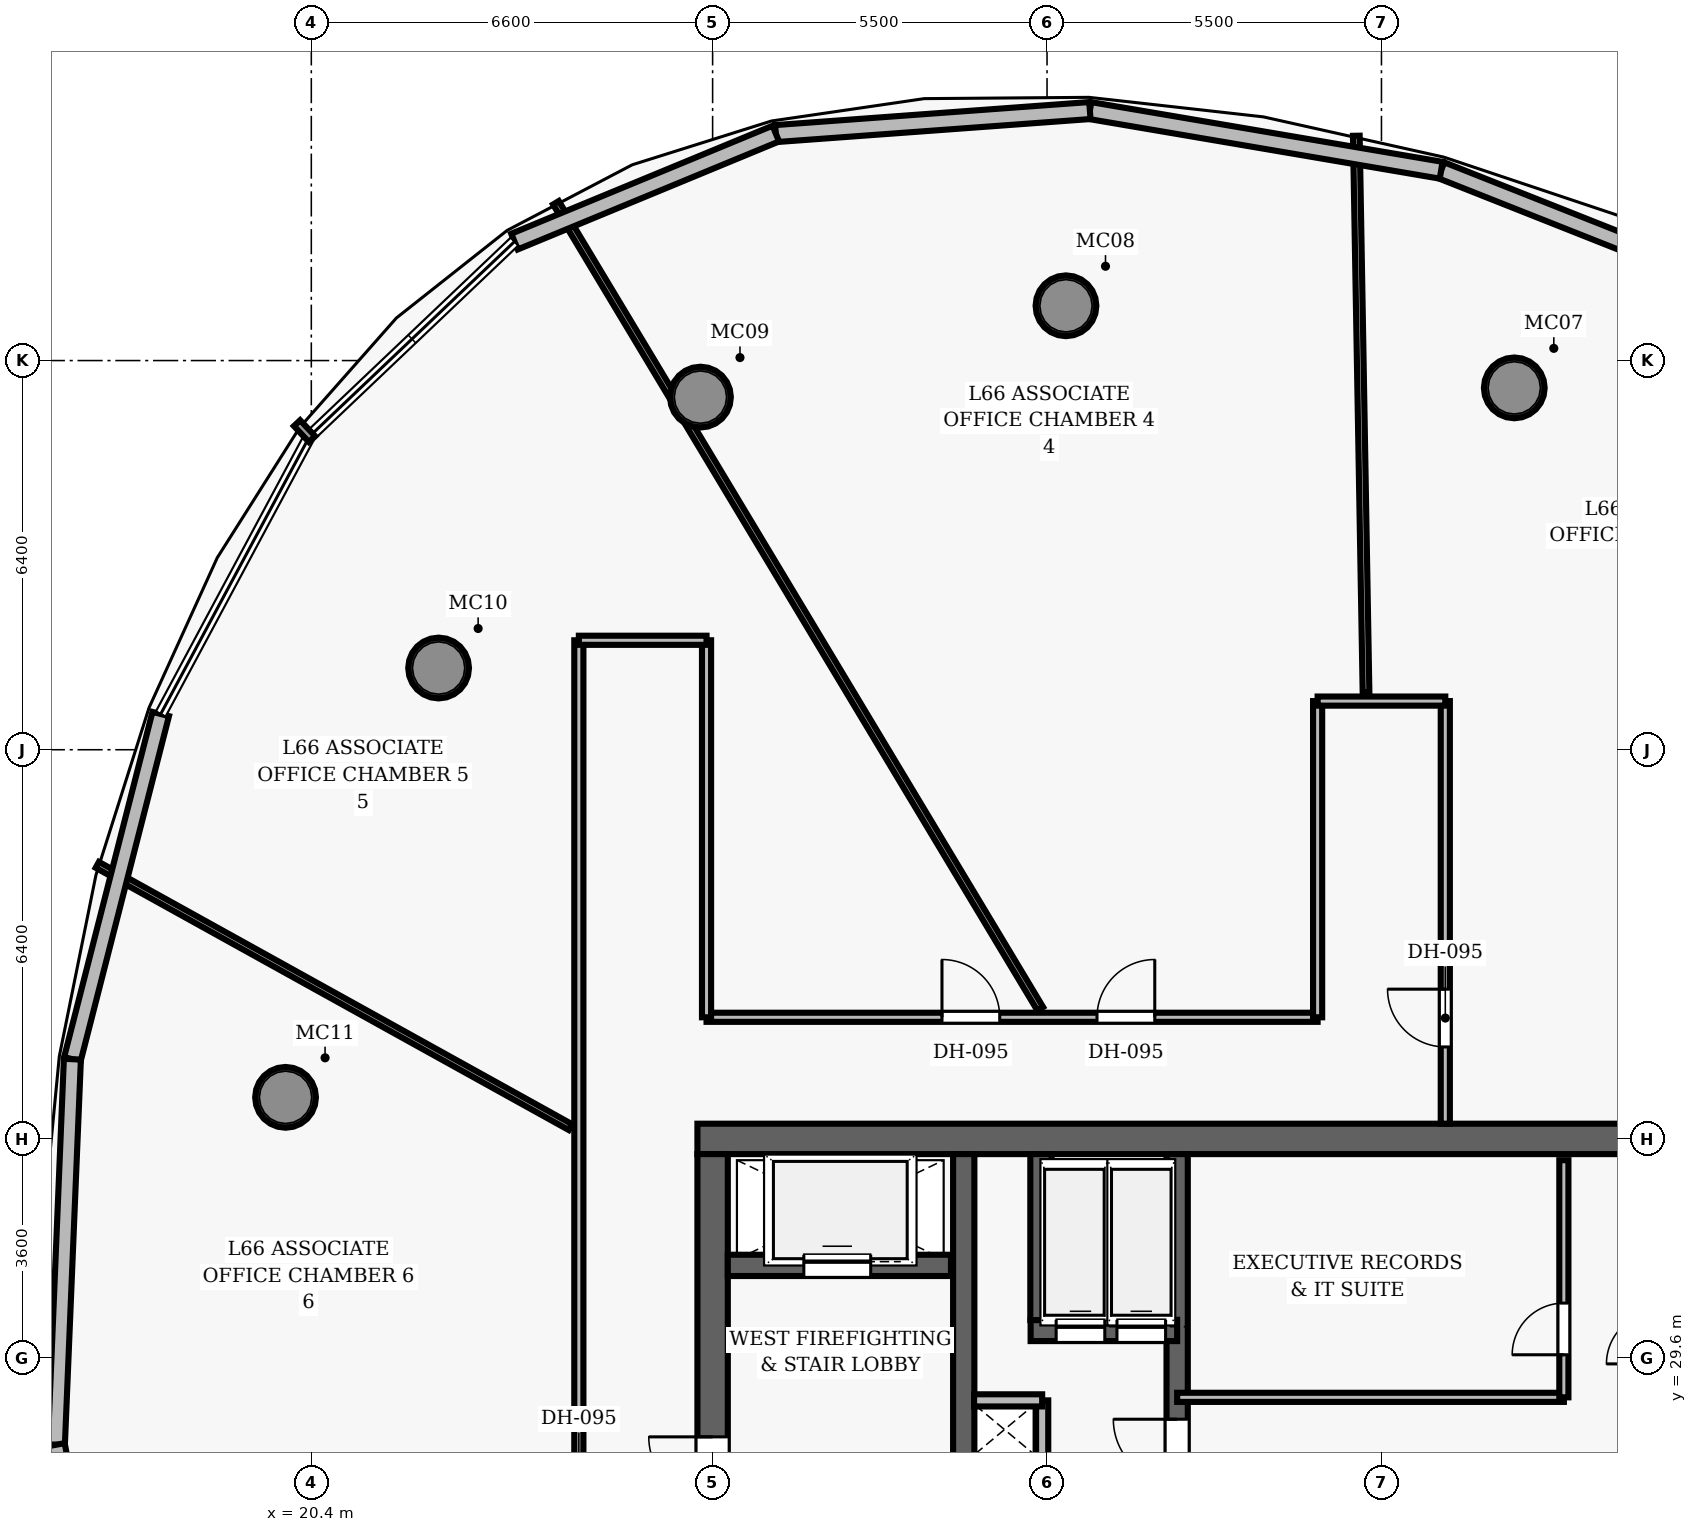
"""IFC4 building model, lengths in metres.
Left out: names, types, materials, properties, quantities, classifications, styles, units other than length and angle.
Written with IfcOpenShell. Run it as: python <this file> out.ifc"""

import sys

from ifc_helpers import new_model, si_unit, direction, frame, frame_2d, origin, origin_2d, place, context, subcontext, project, spatial, rectangle, hollow_circle, extrude, element, fill, save


model = new_model("IFC4")
c1 = context("Model", 3, precision=1e-05, world=origin(), true_north=direction((0.0, 1.0)))
c2 = subcontext(c1, "Body", "Model", "MODEL_VIEW")
j1 = project(units=[si_unit("LENGTHUNIT", "METRE"), si_unit("PLANEANGLEUNIT", "RADIAN")], contexts=[c1])
p1 = place(None, origin())
s1 = spatial("IfcSite", under=j1, at=p1, CompositionType="ELEMENT")
p2 = place(p1, origin())
s2 = spatial("IfcBuilding", under=s1, at=p2, CompositionType="ELEMENT")
p3 = place(p2, frame((0.0, 0.0, 261.3)))
s3 = spatial("IfcBuildingStorey", under=s2, at=p3, CompositionType="ELEMENT", Elevation=261.3)
p4 = place(p3, frame((26.75, 33.2, 0.0), z_axis=(0.0, 0.0, 1.0), x_axis=(1.0, 0.0, 0.0)))
e1 = element("IfcWall", 1, at=p4, inside=s3, PredefinedType="SHEAR", context=c2, shape_type="SweptSolid", body=[
    extrude(rectangle(XDim=22.5, YDim=0.5, at=frame_2d((11.25, 0.0))), origin(), (0.0, 0.0, 1.0), 3.85),
])
p5 = place(p3, frame((27.0, 19.05, 0.0), z_axis=(0.0, 0.0, 1.0), x_axis=(0.0, 1.0, 0.0)))
e2 = element("IfcWall", 2, at=p5, inside=s3, PredefinedType="SHEAR", context=c2, shape_type="SweptSolid", body=[
    extrude(rectangle(XDim=13.9, YDim=0.5, at=frame_2d((6.95, 0.0))), origin(), (0.0, 0.0, 1.0), 3.85),
])
p6 = place(p5, frame((8.2, 0.0, 0.0)))
e3 = element("IfcOpeningElement", 3, at=p6, cuts=e2, PredefinedType="OPENING", context=c2, shape_type="SweptSolid", body=[
    extrude(rectangle(XDim=1.05, YDim=2.15, at=frame_2d((0.525, 1.075))), frame((0.0, 0.26, 0.0), z_axis=(0.0, -1.0, 0.0), x_axis=(1.0, 0.0, 0.0)), (0.0, 0.0, 1.0), 0.52),
])
p7 = place(p3, frame((31.13, 19.05, 0.0), z_axis=(0.0, 0.0, 1.0), x_axis=(0.0, 1.0, 0.0)))
e4 = element("IfcWall", 4, at=p7, inside=s3, PredefinedType="SHEAR", context=c2, shape_type="SweptSolid", body=[
    extrude(rectangle(XDim=13.9, YDim=0.35, at=frame_2d((6.95, 0.0))), origin(), (0.0, 0.0, 1.0), 3.85),
])
for number, where, z_axis, x_axis in (
    (5, (40.185, 45.551, 0.0), (0.0, 0.0, 1.0), (1.0, 0.0, 0.0)),
    (6, (32.812, 46.901, 0.0), (0.0, 0.0, 1.0), (1.0, 0.0, 0.0)),
    (7, (26.8, 45.399, 0.0), (0.0, 0.0, 1.0), (1.0, 0.0, 0.0)),
    (8, (22.494, 40.944, 0.0), (0.0, 0.0, 1.0), (1.0, 0.0, 0.0)),
    (9, (19.976, 33.884, 0.0), (0.0, 0.0, 1.0), (1.0, 0.0, 0.0)),
):
    element("IfcColumn", number, at=place(p3, frame(where, z_axis=z_axis, x_axis=x_axis)), inside=s3, PredefinedType="COLUMN", context=c2, shape_type="SweptSolid", body=[
        extrude(hollow_circle(Radius=0.5, WallThickness=0.045, at=origin_2d()), origin(), (0.0, 0.0, 1.0), 3.85),
    ])
p8 = place(p3, frame((27.25, 31.12, 0.0), z_axis=(0.0, 0.0, 1.0), x_axis=(1.0, 0.0, 0.0)))
e10 = element("IfcWall", 10, at=p8, inside=s3, PredefinedType="SHEAR", context=c2, shape_type="SweptSolid", body=[
    extrude(rectangle(XDim=3.67, YDim=0.35, at=frame_2d((1.835, 0.0))), origin(), (0.0, 0.0, 1.0), 3.04),
])
p9 = place(p8, frame((1.25, 0.0, 0.0)))
e11 = element("IfcOpeningElement", 11, at=p9, cuts=e10, PredefinedType="OPENING", context=c2, shape_type="SweptSolid", body=[
    extrude(rectangle(XDim=1.1, YDim=2.15, at=frame_2d((0.55, 1.075))), frame((0.0, 0.185, 0.0), z_axis=(0.0, -1.0, 0.0), x_axis=(1.0, 0.0, 0.0)), (0.0, 0.0, 1.0), 0.37),
])
p10 = place(p3, frame((34.64, 26.69, 0.0), z_axis=(0.0, 0.0, 1.0), x_axis=(0.0, 1.0, 0.0)))
e12 = element("IfcWall", 12, at=p10, inside=s3, PredefinedType="SHEAR", context=c2, shape_type="SweptSolid", body=[
    extrude(rectangle(XDim=6.26, YDim=0.35, at=frame_2d((3.13, 0.0))), origin(), (0.0, 0.0, 1.0), 3.85),
])
p11 = place(p10, frame((0.85, 0.0, 0.0)))
e13 = element("IfcOpeningElement", 13, at=p11, cuts=e12, PredefinedType="OPENING", context=c2, shape_type="SweptSolid", body=[
    extrude(rectangle(XDim=1.05, YDim=2.15, at=frame_2d((0.525, 1.075))), frame((0.0, 0.185, 0.0), z_axis=(0.0, -1.0, 0.0), x_axis=(1.0, 0.0, 0.0)), (0.0, 0.0, 1.0), 0.37),
])
p12 = place(p3, frame((32.23, 30.05, 0.0), z_axis=(0.0, 0.0, 1.0), x_axis=(1.0, 0.0, 0.0)))
e14 = element("IfcWall", 14, at=p12, inside=s3, PredefinedType="SHEAR", context=c2, shape_type="SweptSolid", body=[
    extrude(rectangle(XDim=2.41, YDim=0.35, at=frame_2d((1.205, 0.0))), origin(), (0.0, 0.0, 1.0), 3.04),
])
p13 = place(p12, frame((0.42, 0.0, 0.0)))
e15 = element("IfcOpeningElement", 15, at=p13, cuts=e14, PredefinedType="OPENING", context=c2, shape_type="SweptSolid", body=[
    extrude(rectangle(XDim=0.8, YDim=2.15, at=frame_2d((0.4, 1.075))), frame((0.0, 0.185, 0.0), z_axis=(0.0, -1.0, 0.0), x_axis=(1.0, 0.0, 0.0)), (0.0, 0.0, 1.0), 0.37),
])
p14 = place(p12, frame((1.42, 0.0, 0.0)))
e16 = element("IfcOpeningElement", 16, at=p14, cuts=e14, PredefinedType="OPENING", context=c2, shape_type="SweptSolid", body=[
    extrude(rectangle(XDim=0.8, YDim=2.15, at=frame_2d((0.4, 1.075))), frame((0.0, 0.185, 0.0), z_axis=(0.0, -1.0, 0.0), x_axis=(1.0, 0.0, 0.0)), (0.0, 0.0, 1.0), 0.37),
])
p15 = place(p3, frame((32.4, 30.22, 0.0), z_axis=(0.0, 0.0, 1.0), x_axis=(0.0, 1.0, 0.0)))
e17 = element("IfcWall", 17, at=p15, inside=s3, PredefinedType="SHEAR", context=c2, shape_type="SweptSolid", body=[
    extrude(rectangle(XDim=2.73, YDim=0.35, at=frame_2d((1.365, 0.0))), origin(), (0.0, 0.0, 1.0), 3.04),
])
p16 = place(p3, frame((32.42, 26.86, 0.0), z_axis=(0.0, 0.0, 1.0), x_axis=(0.0, 1.0, 0.0)))
e18 = element("IfcWall", 18, at=p16, inside=s3, PredefinedType="PARTITIONING", context=c2, shape_type="SweptSolid", body=[
    extrude(rectangle(XDim=2.04, YDim=0.2, at=frame_2d((1.02, 0.0))), origin(), (0.0, 0.0, 1.0), 3.04),
])
p17 = place(p16, frame((0.14, 0.0, 0.0)))
e19 = element("IfcOpeningElement", 19, at=p17, cuts=e18, PredefinedType="OPENING", context=c2, shape_type="SweptSolid", body=[
    extrude(rectangle(XDim=0.8, YDim=2.05, at=frame_2d((0.4, 1.025))), frame((0.0, 0.11, 0.0), z_axis=(0.0, -1.0, 0.0), x_axis=(1.0, 0.0, 0.0)), (0.0, 0.0, 1.0), 0.22),
])
p18 = place(p3, frame((31.3, 28.9, 0.0), z_axis=(0.0, 0.0, 1.0), x_axis=(1.0, 0.0, 0.0)))
e20 = element("IfcWall", 20, at=p18, inside=s3, PredefinedType="PARTITIONING", context=c2, shape_type="SweptSolid", body=[
    extrude(rectangle(XDim=1.12, YDim=0.2, at=frame_2d((0.56, 0.0))), origin(), (0.0, 0.0, 1.0), 3.04),
])
p19 = place(p3, frame((34.64, 28.95, 0.0), z_axis=(0.0, 0.0, 1.0), x_axis=(1.0, 0.0, 0.0)))
e21 = element("IfcWall", 21, at=p19, inside=s3, PredefinedType="PARTITIONING", context=c2, shape_type="SweptSolid", body=[
    extrude(rectangle(XDim=6.36, YDim=0.15, at=frame_2d((3.18, 0.0))), origin(), (0.0, 0.0, 1.0), 3.04),
])
p20 = place(p3, frame((41.0, 28.95, 0.0), z_axis=(0.0, 0.0, 1.0), x_axis=(0.0, 1.0, 0.0)))
e22 = element("IfcWall", 22, at=p20, inside=s3, PredefinedType="PARTITIONING", context=c2, shape_type="SweptSolid", body=[
    extrude(rectangle(XDim=3.9, YDim=0.15, at=frame_2d((1.95, 0.0))), origin(), (0.0, 0.0, 1.0), 3.04),
])
p21 = place(p20, frame((0.7, 0.0, 0.0)))
e23 = element("IfcOpeningElement", 23, at=p21, cuts=e22, PredefinedType="OPENING", context=c2, shape_type="SweptSolid", body=[
    extrude(rectangle(XDim=0.85, YDim=2.1, at=frame_2d((0.425, 1.05))), frame((0.0, 0.085, 0.0), z_axis=(0.0, -1.0, 0.0), x_axis=(1.0, 0.0, 0.0)), (0.0, 0.0, 1.0), 0.17),
])
p22 = place(p3, frame((26.9, 35.2, 0.0), z_axis=(0.0, 0.0, 1.0), x_axis=(1.0, 0.0, 0.0)))
e24 = element("IfcWall", 24, at=p22, inside=s3, PredefinedType="PARTITIONING", context=c2, shape_type="SweptSolid", body=[
    extrude(rectangle(XDim=10.05, YDim=0.15, at=frame_2d((5.025, 0.0))), origin(), (0.0, 0.0, 1.0), 3.04),
])
p23 = place(p22, frame((6.422, 0.0, 0.0)))
e25 = element("IfcOpeningElement", 25, at=p23, cuts=e24, PredefinedType="OPENING", context=c2, shape_type="SweptSolid", body=[
    extrude(rectangle(XDim=0.95, YDim=2.15, at=frame_2d((0.475, 1.075))), frame((0.0, 0.085, 0.0), z_axis=(0.0, -1.0, 0.0), x_axis=(1.0, 0.0, 0.0)), (0.0, 0.0, 1.0), 0.17),
])
p24 = place(p22, frame((3.872, 0.0, 0.0)))
e26 = element("IfcOpeningElement", 26, at=p24, cuts=e24, PredefinedType="OPENING", context=c2, shape_type="SweptSolid", body=[
    extrude(rectangle(XDim=0.95, YDim=2.15, at=frame_2d((0.475, 1.075))), frame((0.0, 0.085, 0.0), z_axis=(0.0, -1.0, 0.0), x_axis=(1.0, 0.0, 0.0)), (0.0, 0.0, 1.0), 0.17),
])
p25 = place(p3, frame((24.8, 11.32, 0.0), z_axis=(0.0, 0.0, 1.0), x_axis=(0.0, 1.0, 0.0)))
e27 = element("IfcWall", 27, at=p25, inside=s3, PredefinedType="PARTITIONING", context=c2, shape_type="SweptSolid", body=[
    extrude(rectangle(XDim=30.08, YDim=0.15, at=frame_2d((15.04, 0.0))), origin(), (0.0, 0.0, 1.0), 3.04),
])
p26 = place(p25, frame((15.729, 0.0, 0.0)))
e28 = element("IfcOpeningElement", 28, at=p26, cuts=e27, PredefinedType="OPENING", context=c2, shape_type="SweptSolid", body=[
    extrude(rectangle(XDim=0.95, YDim=2.15, at=frame_2d((0.475, 1.075))), frame((0.0, 0.085, 0.0), z_axis=(0.0, -1.0, 0.0), x_axis=(1.0, 0.0, 0.0)), (0.0, 0.0, 1.0), 0.17),
])
p27 = place(p25, frame((11.34, 0.0, 0.0)))
e29 = element("IfcOpeningElement", 29, at=p27, cuts=e27, PredefinedType="OPENING", context=c2, shape_type="SweptSolid", body=[
    extrude(rectangle(XDim=0.95, YDim=2.15, at=frame_2d((0.475, 1.075))), frame((0.0, 0.085, 0.0), z_axis=(0.0, -1.0, 0.0), x_axis=(1.0, 0.0, 0.0)), (0.0, 0.0, 1.0), 0.17),
])
p28 = place(p3, frame((26.9, 35.2, 0.0), z_axis=(0.0, 0.0, 1.0), x_axis=(0.0, 1.0, 0.0)))
e30 = element("IfcWall", 30, at=p28, inside=s3, PredefinedType="PARTITIONING", context=c2, shape_type="SweptSolid", body=[
    extrude(rectangle(XDim=6.2, YDim=0.15, at=frame_2d((3.1, 0.0))), origin(), (0.0, 0.0, 1.0), 3.04),
])
p29 = place(p3, frame((24.8, 41.4, 0.0), z_axis=(0.0, 0.0, 1.0), x_axis=(1.0, 0.0, 0.0)))
e31 = element("IfcWall", 31, at=p29, inside=s3, PredefinedType="PARTITIONING", context=c2, shape_type="SweptSolid", body=[
    extrude(rectangle(XDim=2.1, YDim=0.15, at=frame_2d((1.05, 0.0))), origin(), (0.0, 0.0, 1.0), 3.04),
])
p30 = place(p3, frame((36.95, 35.2, 0.0), z_axis=(0.0, 0.0, 1.0), x_axis=(0.0, 1.0, 0.0)))
e32 = element("IfcWall", 32, at=p30, inside=s3, PredefinedType="PARTITIONING", context=c2, shape_type="SweptSolid", body=[
    extrude(rectangle(XDim=5.2, YDim=0.15, at=frame_2d((2.6, 0.0))), origin(), (0.0, 0.0, 1.0), 3.04),
])
p31 = place(p3, frame((39.05, 33.45, 0.0), z_axis=(0.0, 0.0, 1.0), x_axis=(0.0, 1.0, 0.0)))
e33 = element("IfcWall", 33, at=p31, inside=s3, PredefinedType="PARTITIONING", context=c2, shape_type="SweptSolid", body=[
    extrude(rectangle(XDim=6.95, YDim=0.15, at=frame_2d((3.475, 0.0))), origin(), (0.0, 0.0, 1.0), 3.04),
])
p32 = place(p31, frame((1.262, 0.0, 0.0)))
e34 = element("IfcOpeningElement", 34, at=p32, cuts=e33, PredefinedType="OPENING", context=c2, shape_type="SweptSolid", body=[
    extrude(rectangle(XDim=0.95, YDim=2.15, at=frame_2d((0.475, 1.075))), frame((0.0, 0.085, 0.0), z_axis=(0.0, -1.0, 0.0), x_axis=(1.0, 0.0, 0.0)), (0.0, 0.0, 1.0), 0.17),
])
p33 = place(p3, frame((36.95, 40.4, 0.0), z_axis=(0.0, 0.0, 1.0), x_axis=(1.0, 0.0, 0.0)))
e35 = element("IfcWall", 35, at=p33, inside=s3, PredefinedType="PARTITIONING", context=c2, shape_type="SweptSolid", body=[
    extrude(rectangle(XDim=2.1, YDim=0.15, at=frame_2d((1.05, 0.0))), origin(), (0.0, 0.0, 1.0), 3.04),
])
p34 = place(p3, frame((37.746, 40.54, 0.0), z_axis=(0.0, 0.0, 1.0), x_axis=(-0.01743409501, 0.999848014616, 0.0)))
e36 = element("IfcWall", 36, at=p34, inside=s3, PredefinedType="PARTITIONING", context=c2, shape_type="SweptSolid", body=[
    extrude(rectangle(XDim=9.158, YDim=0.11, at=frame_2d((4.579, 0.0))), origin(), (0.0, 0.0, 1.0), 3.04),
])
p35 = place(p3, frame((32.388, 35.34, 0.0), z_axis=(0.0, 0.0, 1.0), x_axis=(-0.515043577983, 0.857163994098, 0.0)))
e37 = element("IfcWall", 37, at=p35, inside=s3, PredefinedType="PARTITIONING", context=c2, shape_type="SweptSolid", body=[
    extrude(rectangle(XDim=15.464, YDim=0.11, at=frame_2d((7.732, 0.0))), origin(), (0.0, 0.0, 1.0), 3.04),
])
p36 = place(p3, frame((24.66, 33.395, 0.0), z_axis=(0.0, 0.0, 1.0), x_axis=(-0.874626832341, 0.48479676582, 0.0)))
e38 = element("IfcWall", 38, at=p36, inside=s3, PredefinedType="PARTITIONING", context=c2, shape_type="SweptSolid", body=[
    extrude(rectangle(XDim=8.895, YDim=0.11, at=frame_2d((4.448, 0.0))), origin(), (0.0, 0.0, 1.0), 3.04),
])
p37 = place(p3, frame((38.982, 49.13, 0.0), z_axis=(0.0, 0.0, 1.0), x_axis=(0.929631768462, -0.36848985748, 0.0)))
e39 = element("IfcWall", 39, at=p37, inside=s3, PredefinedType="SOLIDWALL", context=c2, shape_type="SweptSolid", body=[
    extrude(rectangle(XDim=6.345, YDim=0.28, at=frame_2d((3.173, 0.0))), origin(), (0.0, 0.0, 1.0), 3.625),
])
p38 = place(p3, frame((33.205, 50.112, 0.0), z_axis=(0.0, 0.0, 1.0), x_axis=(0.985868784633, -0.167519370479, 0.0)))
e40 = element("IfcWall", 40, at=p38, inside=s3, PredefinedType="SOLIDWALL", context=c2, shape_type="SweptSolid", body=[
    extrude(rectangle(XDim=5.86, YDim=0.28, at=frame_2d((2.93, 0.0))), origin(), (0.0, 0.0, 1.0), 3.625),
])
p39 = place(p3, frame((28.039, 49.733, 0.0), z_axis=(0.0, 0.0, 1.0), x_axis=(0.99732023432, 0.073159758173, 0.0)))
e41 = element("IfcWall", 41, at=p39, inside=s3, PredefinedType="SOLIDWALL", context=c2, shape_type="SweptSolid", body=[
    extrude(rectangle(XDim=5.179, YDim=0.28, at=frame_2d((2.59, 0.0))), origin(), (0.0, 0.0, 1.0), 3.625),
])
p40 = place(p3, frame((23.741, 47.956, 0.0), z_axis=(0.0, 0.0, 1.0), x_axis=(0.924172810094, 0.381974628848, 0.0)))
e42 = element("IfcWall", 42, at=p40, inside=s3, PredefinedType="SOLIDWALL", context=c2, shape_type="SweptSolid", body=[
    extrude(rectangle(XDim=4.65, YDim=0.28, at=frame_2d((2.325, 0.0))), origin(), (0.0, 0.0, 1.0), 3.625),
])
p41 = place(p3, frame((16.47, 34.511, 0.0), z_axis=(0.0, 0.0, 1.0), x_axis=(0.247972381677, 0.968767102004, 0.0)))
e43 = element("IfcWall", 43, at=p41, inside=s3, PredefinedType="SOLIDWALL", context=c2, shape_type="SweptSolid", body=[
    extrude(rectangle(XDim=5.86, YDim=0.28, at=frame_2d((2.93, 0.0))), origin(), (0.0, 0.0, 1.0), 3.625),
])
p42 = place(p3, frame((16.207, 28.171, 0.0), z_axis=(0.0, 0.0, 1.0), x_axis=(0.04151531728, 0.999137867579, 0.0)))
e44 = element("IfcWall", 44, at=p42, inside=s3, PredefinedType="SOLIDWALL", context=c2, shape_type="SweptSolid", body=[
    extrude(rectangle(XDim=6.345, YDim=0.28, at=frame_2d((3.173, 0.0))), origin(), (0.0, 0.0, 1.0), 3.625),
])
p43 = place(p3, frame((17.385, 21.752, 0.0), z_axis=(0.0, 0.0, 1.0), x_axis=(-0.180429210123, 0.983587972748, 0.0)))
e45 = element("IfcWall", 45, at=p43, inside=s3, PredefinedType="SOLIDWALL", context=c2, shape_type="SweptSolid", body=[
    extrude(rectangle(XDim=6.526, YDim=0.28, at=frame_2d((3.263, 0.0))), origin(), (0.0, 0.0, 1.0), 3.625),
])
p44 = place(p6, origin())
e46 = element("IfcDoor", 46, at=p44, inside=s3, OperationType="SINGLE_SWING_RIGHT", PredefinedType="DOOR", context=c2, shape_type="SweptSolid", body=[
    extrude(rectangle(XDim=1.05, YDim=2.15, at=frame_2d((0.525, 1.075))), frame((0.0, 0.025, 0.0), z_axis=(0.0, -1.0, 0.0), x_axis=(1.0, 0.0, 0.0)), (0.0, 0.0, 1.0), 0.05),
])
fill(e3, e46)
p45 = place(p11, origin())
e47 = element("IfcDoor", 47, at=p45, inside=s3, OperationType="SINGLE_SWING_RIGHT", PredefinedType="DOOR", context=c2, shape_type="SweptSolid", body=[
    extrude(rectangle(XDim=1.05, YDim=2.15, at=frame_2d((0.525, 1.075))), frame((0.0, 0.025, 0.0), z_axis=(0.0, -1.0, 0.0), x_axis=(1.0, 0.0, 0.0)), (0.0, 0.0, 1.0), 0.05),
])
fill(e13, e47)
p46 = place(p21, origin())
e48 = element("IfcDoor", 48, at=p46, inside=s3, OperationType="SINGLE_SWING_LEFT", PredefinedType="DOOR", context=c2, shape_type="SweptSolid", body=[
    extrude(rectangle(XDim=0.85, YDim=2.1, at=frame_2d((0.425, 1.05))), frame((0.0, 0.025, 0.0), z_axis=(0.0, -1.0, 0.0), x_axis=(1.0, 0.0, 0.0)), (0.0, 0.0, 1.0), 0.05),
])
fill(e23, e48)
p47 = place(p32, origin())
e49 = element("IfcDoor", 49, at=p47, inside=s3, OperationType="SINGLE_SWING_RIGHT", PredefinedType="DOOR", context=c2, shape_type="SweptSolid", body=[
    extrude(rectangle(XDim=0.95, YDim=2.15, at=frame_2d((0.475, 1.075))), frame((0.0, 0.025, 0.0), z_axis=(0.0, -1.0, 0.0), x_axis=(1.0, 0.0, 0.0)), (0.0, 0.0, 1.0), 0.05),
])
fill(e34, e49)
p48 = place(p23, origin())
e50 = element("IfcDoor", 50, at=p48, inside=s3, OperationType="SINGLE_SWING_RIGHT", PredefinedType="DOOR", context=c2, shape_type="SweptSolid", body=[
    extrude(rectangle(XDim=0.95, YDim=2.15, at=frame_2d((0.475, 1.075))), frame((0.0, 0.025, 0.0), z_axis=(0.0, -1.0, 0.0), x_axis=(1.0, 0.0, 0.0)), (0.0, 0.0, 1.0), 0.05),
])
fill(e25, e50)
p49 = place(p24, origin())
e51 = element("IfcDoor", 51, at=p49, inside=s3, OperationType="SINGLE_SWING_LEFT", PredefinedType="DOOR", context=c2, shape_type="SweptSolid", body=[
    extrude(rectangle(XDim=0.95, YDim=2.15, at=frame_2d((0.475, 1.075))), frame((0.0, 0.025, 0.0), z_axis=(0.0, -1.0, 0.0), x_axis=(1.0, 0.0, 0.0)), (0.0, 0.0, 1.0), 0.05),
])
fill(e26, e51)
p50 = place(p9, origin())
e52 = element("IfcDoor", 52, at=p50, inside=s3, OperationType="SLIDING_TO_LEFT", PredefinedType="DOOR", context=c2, shape_type="SweptSolid", body=[
    extrude(rectangle(XDim=1.1, YDim=2.15, at=frame_2d((0.55, 1.075))), frame((0.0, 0.025, 0.0), z_axis=(0.0, -1.0, 0.0), x_axis=(1.0, 0.0, 0.0)), (0.0, 0.0, 1.0), 0.05),
])
fill(e11, e52)
p51 = place(p13, origin())
e53 = element("IfcDoor", 53, at=p51, inside=s3, OperationType="SLIDING_TO_LEFT", PredefinedType="DOOR", context=c2, shape_type="SweptSolid", body=[
    extrude(rectangle(XDim=0.8, YDim=2.15, at=frame_2d((0.4, 1.075))), frame((0.0, 0.025, 0.0), z_axis=(0.0, -1.0, 0.0), x_axis=(1.0, 0.0, 0.0)), (0.0, 0.0, 1.0), 0.05),
])
fill(e15, e53)
p52 = place(p14, origin())
e54 = element("IfcDoor", 54, at=p52, inside=s3, OperationType="SLIDING_TO_LEFT", PredefinedType="DOOR", context=c2, shape_type="SweptSolid", body=[
    extrude(rectangle(XDim=0.8, YDim=2.15, at=frame_2d((0.4, 1.075))), frame((0.0, 0.025, 0.0), z_axis=(0.0, -1.0, 0.0), x_axis=(1.0, 0.0, 0.0)), (0.0, 0.0, 1.0), 0.05),
])
fill(e16, e54)
save(model, sys.argv[1])
